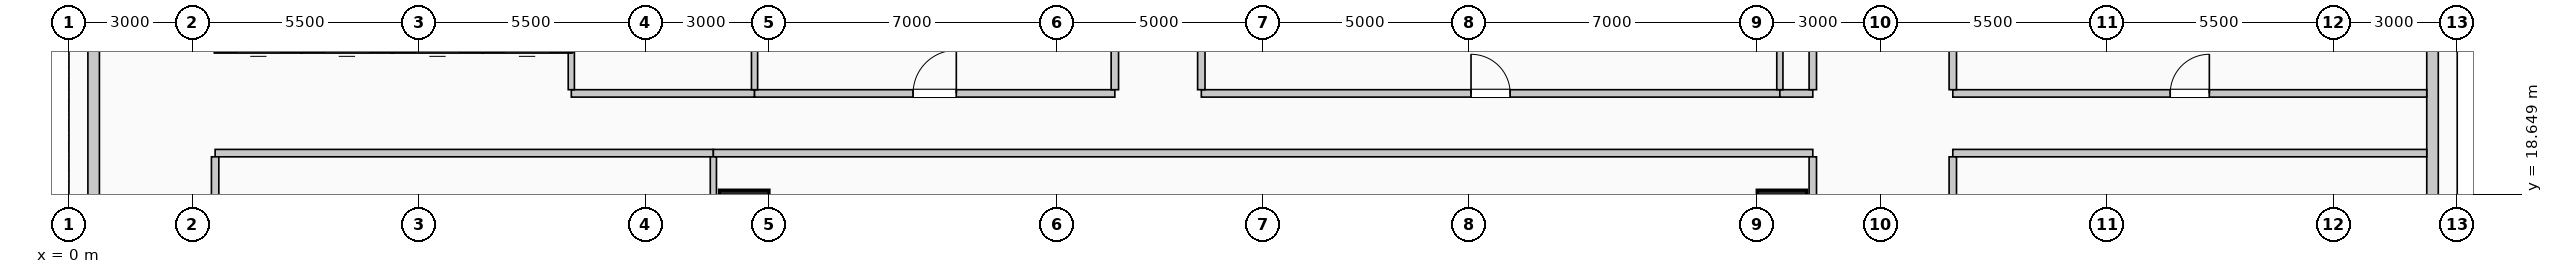
"""IFC4 building model, lengths in metres.
Left out: names, types, materials, properties, quantities, classifications, styles, units other than length and angle.
Written with IfcOpenShell. Run it as: python <this file> out.ifc"""

import sys

from ifc_helpers import new_model, si_unit, direction, frame, frame_2d, origin, origin_2d, place, context, subcontext, project, spatial, rectangle, extrude, element, fill, save


model = new_model("IFC4")
c1 = context("Model", 3, precision=1e-05, world=origin(), true_north=direction((0.0, 1.0)))
c2 = subcontext(c1, "Body", "Model", "MODEL_VIEW")
j1 = project(units=[si_unit("LENGTHUNIT", "METRE"), si_unit("PLANEANGLEUNIT", "RADIAN")], contexts=[c1])
p1 = place(None, origin())
s1 = spatial("IfcSite", under=j1, at=p1, CompositionType="ELEMENT")
p2 = place(p1, origin())
s2 = spatial("IfcBuilding", under=s1, at=p2, CompositionType="ELEMENT")
p3 = place(p2, frame((0.0, 0.0, 58.6)))
s3 = spatial("IfcBuildingStorey", under=s2, at=p3, CompositionType="ELEMENT", Elevation=58.6)
for number, where, z_axis, x_axis in (
    (1, (16.4, 18.0, 0.0), (0.0, 0.0, 1.0), (1.0, 0.0, 0.0)),
    (2, (41.6, 18.0, 0.0), (0.0, 0.0, 1.0), (1.0, 0.0, 0.0)),
):
    element("IfcColumn", number, at=place(p3, frame(where, z_axis=z_axis, x_axis=x_axis)), inside=s3, PredefinedType="COLUMN", context=c2, shape_type="SweptSolid", body=[
        extrude(rectangle(XDim=1.2, YDim=1.5, at=origin_2d()), origin(), (0.0, 0.0, 1.0), 4.0),
    ])
for number, where, z_axis, x_axis in (
    (3, (0.6, 18.47, 0.0), (0.0, 0.0, 1.0), (0.0, 1.0, 0.0)),
    (4, (57.4, 25.53, 0.0), (0.0, 0.0, 1.0), (0.0, -1.0, 0.0)),
):
    element("IfcWall", number, at=place(p3, frame(where, z_axis=z_axis, x_axis=x_axis)), inside=s3, PredefinedType="SOLIDWALL", context=c2, shape_type="SweptSolid", body=[
        extrude(rectangle(XDim=7.06, YDim=0.28, at=frame_2d((3.53, 0.0))), origin(), (0.0, 0.0, 1.0), 2.85),
    ])
p4 = place(p3, frame((5.65, 22.25, 0.0), z_axis=(0.0, 0.0, 1.0), x_axis=(-1.0, 0.0, 0.0)))
e5 = element("IfcWall", 5, at=p4, inside=s3, PredefinedType="SOLIDWALL", context=c2, shape_type="SweptSolid", body=[
    extrude(rectangle(XDim=2.1, YDim=0.3, at=frame_2d((1.05, 0.0))), origin(), (0.0, 0.0, 1.0), 4.0),
])
p5 = place(p4, frame((0.5, 0.0, 0.0)))
e6 = element("IfcOpeningElement", 6, at=p5, cuts=e5, PredefinedType="OPENING", context=c2, shape_type="SweptSolid", body=[
    extrude(rectangle(XDim=1.1, YDim=2.2, at=frame_2d((0.55, 1.1))), frame((0.0, 0.16, 0.0), z_axis=(0.0, -1.0, 0.0), x_axis=(1.0, 0.0, 0.0)), (0.0, 0.0, 1.0), 0.32),
])
p6 = place(p3, frame((7.85, 22.25, 0.0), z_axis=(0.0, 0.0, 1.0), x_axis=(-1.0, 0.0, 0.0)))
e7 = element("IfcWall", 7, at=p6, inside=s3, PredefinedType="SOLIDWALL", context=c2, shape_type="SweptSolid", body=[
    extrude(rectangle(XDim=2.2, YDim=0.3, at=frame_2d((1.1, 0.0))), origin(), (0.0, 0.0, 1.0), 4.0),
])
p7 = place(p6, frame((0.55, 0.0, 0.0)))
e8 = element("IfcOpeningElement", 8, at=p7, cuts=e7, PredefinedType="OPENING", context=c2, shape_type="SweptSolid", body=[
    extrude(rectangle(XDim=1.1, YDim=2.2, at=frame_2d((0.55, 1.1))), frame((0.0, 0.16, 0.0), z_axis=(0.0, -1.0, 0.0), x_axis=(1.0, 0.0, 0.0)), (0.0, 0.0, 1.0), 0.32),
])
p8 = place(p3, frame((10.05, 22.25, 0.0), z_axis=(0.0, 0.0, 1.0), x_axis=(-1.0, 0.0, 0.0)))
e9 = element("IfcWall", 9, at=p8, inside=s3, PredefinedType="SOLIDWALL", context=c2, shape_type="SweptSolid", body=[
    extrude(rectangle(XDim=2.2, YDim=0.3, at=frame_2d((1.1, 0.0))), origin(), (0.0, 0.0, 1.0), 4.0),
])
p9 = place(p8, frame((0.55, 0.0, 0.0)))
e10 = element("IfcOpeningElement", 10, at=p9, cuts=e9, PredefinedType="OPENING", context=c2, shape_type="SweptSolid", body=[
    extrude(rectangle(XDim=1.1, YDim=2.2, at=frame_2d((0.55, 1.1))), frame((0.0, 0.16, 0.0), z_axis=(0.0, -1.0, 0.0), x_axis=(1.0, 0.0, 0.0)), (0.0, 0.0, 1.0), 0.32),
])
p10 = place(p3, frame((12.2, 22.25, 0.0), z_axis=(0.0, 0.0, 1.0), x_axis=(-1.0, 0.0, 0.0)))
e11 = element("IfcWall", 11, at=p10, inside=s3, PredefinedType="SOLIDWALL", context=c2, shape_type="SweptSolid", body=[
    extrude(rectangle(XDim=2.15, YDim=0.3, at=frame_2d((1.075, 0.0))), origin(), (0.0, 0.0, 1.0), 4.0),
])
p11 = place(p10, frame((0.525, 0.0, 0.0)))
e12 = element("IfcOpeningElement", 12, at=p11, cuts=e11, PredefinedType="OPENING", context=c2, shape_type="SweptSolid", body=[
    extrude(rectangle(XDim=1.1, YDim=2.2, at=frame_2d((0.55, 1.1))), frame((0.0, 0.16, 0.0), z_axis=(0.0, -1.0, 0.0), x_axis=(1.0, 0.0, 0.0)), (0.0, 0.0, 1.0), 0.32),
])
p12 = place(p3, frame((3.55, 19.65, 0.0), z_axis=(0.0, 0.0, 1.0), x_axis=(1.0, 0.0, 0.0)))
e13 = element("IfcWall", 13, at=p12, inside=s3, PredefinedType="PARTITIONING", context=c2, shape_type="SweptSolid", body=[
    extrude(rectangle(XDim=12.1, YDim=0.18, at=frame_2d((6.05, 0.0))), origin(), (0.0, 0.0, 1.0), 3.7),
])
p13 = place(p3, frame((15.65, 19.65, 0.0), z_axis=(0.0, 0.0, 1.0), x_axis=(1.0, 0.0, 0.0)))
e14 = element("IfcWall", 14, at=p13, inside=s3, PredefinedType="PARTITIONING", context=c2, shape_type="SweptSolid", body=[
    extrude(rectangle(XDim=26.7, YDim=0.18, at=frame_2d((13.35, 0.0))), origin(), (0.0, 0.0, 1.0), 3.7),
])
p14 = place(p3, frame((45.75, 19.65, 0.0), z_axis=(0.0, 0.0, 1.0), x_axis=(1.0, 0.0, 0.0)))
e15 = element("IfcWall", 15, at=p14, inside=s3, PredefinedType="PARTITIONING", context=c2, shape_type="SweptSolid", body=[
    extrude(rectangle(XDim=11.51, YDim=0.18, at=frame_2d((5.755, 0.0))), origin(), (0.0, 0.0, 1.0), 3.7),
])
p15 = place(p3, frame((12.2, 21.1, 0.0), z_axis=(0.0, 0.0, 1.0), x_axis=(1.0, 0.0, 0.0)))
e16 = element("IfcWall", 16, at=p15, inside=s3, PredefinedType="PARTITIONING", context=c2, shape_type="SweptSolid", body=[
    extrude(rectangle(XDim=4.45, YDim=0.18, at=frame_2d((2.225, 0.0))), origin(), (0.0, 0.0, 1.0), 3.7),
])
p16 = place(p3, frame((16.65, 21.1, 0.0), z_axis=(0.0, 0.0, 1.0), x_axis=(1.0, 0.0, 0.0)))
e17 = element("IfcWall", 17, at=p16, inside=s3, PredefinedType="PARTITIONING", context=c2, shape_type="SweptSolid", body=[
    extrude(rectangle(XDim=8.75, YDim=0.18, at=frame_2d((4.375, 0.0))), origin(), (0.0, 0.0, 1.0), 3.7),
])
p17 = place(p16, frame((3.85, 0.0, 0.0)))
e18 = element("IfcOpeningElement", 18, at=p17, cuts=e17, PredefinedType="OPENING", context=c2, shape_type="SweptSolid", body=[
    extrude(rectangle(XDim=1.05, YDim=2.15, at=frame_2d((0.525, 1.075))), frame((0.0, 0.1, 0.0), z_axis=(0.0, -1.0, 0.0), x_axis=(1.0, 0.0, 0.0)), (0.0, 0.0, 1.0), 0.2),
])
p18 = place(p3, frame((27.5, 21.1, 0.0), z_axis=(0.0, 0.0, 1.0), x_axis=(1.0, 0.0, 0.0)))
e19 = element("IfcWall", 19, at=p18, inside=s3, PredefinedType="PARTITIONING", context=c2, shape_type="SweptSolid", body=[
    extrude(rectangle(XDim=14.05, YDim=0.18, at=frame_2d((7.025, 0.0))), origin(), (0.0, 0.0, 1.0), 3.7),
])
p19 = place(p18, frame((6.55, 0.0, 0.0)))
e20 = element("IfcOpeningElement", 20, at=p19, cuts=e19, PredefinedType="OPENING", context=c2, shape_type="SweptSolid", body=[
    extrude(rectangle(XDim=0.95, YDim=2.15, at=frame_2d((0.475, 1.075))), frame((0.0, 0.1, 0.0), z_axis=(0.0, -1.0, 0.0), x_axis=(1.0, 0.0, 0.0)), (0.0, 0.0, 1.0), 0.2),
])
p20 = place(p3, frame((41.55, 21.1, 0.0), z_axis=(0.0, 0.0, 1.0), x_axis=(1.0, 0.0, 0.0)))
e21 = element("IfcWall", 21, at=p20, inside=s3, PredefinedType="PARTITIONING", context=c2, shape_type="SweptSolid", body=[
    extrude(rectangle(XDim=0.8, YDim=0.18, at=frame_2d((0.4, 0.0))), origin(), (0.0, 0.0, 1.0), 3.7),
])
p21 = place(p3, frame((45.75, 21.1, 0.0), z_axis=(0.0, 0.0, 1.0), x_axis=(1.0, 0.0, 0.0)))
e22 = element("IfcWall", 22, at=p21, inside=s3, PredefinedType="PARTITIONING", context=c2, shape_type="SweptSolid", body=[
    extrude(rectangle(XDim=11.51, YDim=0.18, at=frame_2d((5.755, 0.0))), origin(), (0.0, 0.0, 1.0), 3.7),
])
p22 = place(p21, frame((5.28, 0.0, 0.0)))
e23 = element("IfcOpeningElement", 23, at=p22, cuts=e22, PredefinedType="OPENING", context=c2, shape_type="SweptSolid", body=[
    extrude(rectangle(XDim=0.95, YDim=2.15, at=frame_2d((0.475, 1.075))), frame((0.0, 0.1, 0.0), z_axis=(0.0, -1.0, 0.0), x_axis=(1.0, 0.0, 0.0)), (0.0, 0.0, 1.0), 0.2),
])
p23 = place(p3, frame((3.55, 16.39, 0.0), z_axis=(0.0, 0.0, 1.0), x_axis=(0.0, 1.0, 0.0)))
e24 = element("IfcWall", 24, at=p23, inside=s3, PredefinedType="PARTITIONING", context=c2, shape_type="SweptSolid", body=[
    extrude(rectangle(XDim=3.17, YDim=0.18, at=frame_2d((1.585, 0.0))), origin(), (0.0, 0.0, 1.0), 3.7),
])
p24 = place(p3, frame((12.2, 21.19, 0.0), z_axis=(0.0, 0.0, 1.0), x_axis=(0.0, 1.0, 0.0)))
e25 = element("IfcWall", 25, at=p24, inside=s3, PredefinedType="PARTITIONING", context=c2, shape_type="SweptSolid", body=[
    extrude(rectangle(XDim=0.91, YDim=0.15, at=frame_2d((0.455, 0.0))), origin(), (0.0, 0.0, 1.0), 3.7),
])
p25 = place(p3, frame((15.65, 16.39, 0.0), z_axis=(0.0, 0.0, 1.0), x_axis=(0.0, 1.0, 0.0)))
e26 = element("IfcWall", 26, at=p25, inside=s3, PredefinedType="PARTITIONING", context=c2, shape_type="SweptSolid", body=[
    extrude(rectangle(XDim=3.17, YDim=0.15, at=frame_2d((1.585, 0.0))), origin(), (0.0, 0.0, 1.0), 3.7),
])
p26 = place(p3, frame((16.65, 21.19, 0.0), z_axis=(0.0, 0.0, 1.0), x_axis=(0.0, 1.0, 0.0)))
e27 = element("IfcWall", 27, at=p26, inside=s3, PredefinedType="PARTITIONING", context=c2, shape_type="SweptSolid", body=[
    extrude(rectangle(XDim=3.735, YDim=0.15, at=frame_2d((1.868, 0.0))), origin(), (0.0, 0.0, 1.0), 2.995),
])
p27 = place(p3, frame((25.4, 21.19, 0.0), z_axis=(0.0, 0.0, 1.0), x_axis=(0.0, 1.0, 0.0)))
e28 = element("IfcWall", 28, at=p27, inside=s3, PredefinedType="PARTITIONING", context=c2, shape_type="SweptSolid", body=[
    extrude(rectangle(XDim=3.735, YDim=0.18, at=frame_2d((1.868, 0.0))), origin(), (0.0, 0.0, 1.0), 3.7),
])
p28 = place(p3, frame((27.5, 21.19, 0.0), z_axis=(0.0, 0.0, 1.0), x_axis=(0.0, 1.0, 0.0)))
e29 = element("IfcWall", 29, at=p28, inside=s3, PredefinedType="PARTITIONING", context=c2, shape_type="SweptSolid", body=[
    extrude(rectangle(XDim=5.72, YDim=0.18, at=frame_2d((2.86, 0.0))), origin(), (0.0, 0.0, 1.0), 3.7),
])
p29 = place(p3, frame((41.55, 21.19, 0.0), z_axis=(0.0, 0.0, 1.0), x_axis=(0.0, 1.0, 0.0)))
e30 = element("IfcWall", 30, at=p29, inside=s3, PredefinedType="PARTITIONING", context=c2, shape_type="SweptSolid", body=[
    extrude(rectangle(XDim=4.06, YDim=0.15, at=frame_2d((2.03, 0.0))), origin(), (0.0, 0.0, 1.0), 2.995),
])
p30 = place(p3, frame((42.35, 16.39, 0.0), z_axis=(0.0, 0.0, 1.0), x_axis=(0.0, 1.0, 0.0)))
e31 = element("IfcWall", 31, at=p30, inside=s3, PredefinedType="PARTITIONING", context=c2, shape_type="SweptSolid", body=[
    extrude(rectangle(XDim=3.17, YDim=0.18, at=frame_2d((1.585, 0.0))), origin(), (0.0, 0.0, 1.0), 3.7),
])
p31 = place(p3, frame((42.35, 21.19, 0.0), z_axis=(0.0, 0.0, 1.0), x_axis=(0.0, 1.0, 0.0)))
e32 = element("IfcWall", 32, at=p31, inside=s3, PredefinedType="PARTITIONING", context=c2, shape_type="SweptSolid", body=[
    extrude(rectangle(XDim=11.085, YDim=0.18, at=frame_2d((5.542, 0.0))), origin(), (0.0, 0.0, 1.0), 3.7),
])
p32 = place(p3, frame((45.75, 16.39, 0.0), z_axis=(0.0, 0.0, 1.0), x_axis=(0.0, 1.0, 0.0)))
e33 = element("IfcWall", 33, at=p32, inside=s3, PredefinedType="PARTITIONING", context=c2, shape_type="SweptSolid", body=[
    extrude(rectangle(XDim=3.17, YDim=0.18, at=frame_2d((1.585, 0.0))), origin(), (0.0, 0.0, 1.0), 3.7),
])
p33 = place(p3, frame((45.75, 21.19, 0.0), z_axis=(0.0, 0.0, 1.0), x_axis=(0.0, 1.0, 0.0)))
e34 = element("IfcWall", 34, at=p33, inside=s3, PredefinedType="PARTITIONING", context=c2, shape_type="SweptSolid", body=[
    extrude(rectangle(XDim=6.615, YDim=0.18, at=frame_2d((3.308, 0.0))), origin(), (0.0, 0.0, 1.0), 3.7),
])
p34 = place(p17, origin())
e35 = element("IfcDoor", 35, at=p34, inside=s3, OperationType="SINGLE_SWING_RIGHT", PredefinedType="DOOR", context=c2, shape_type="SweptSolid", body=[
    extrude(rectangle(XDim=1.05, YDim=2.15, at=frame_2d((0.525, 1.075))), frame((0.0, 0.025, 0.0), z_axis=(0.0, -1.0, 0.0), x_axis=(1.0, 0.0, 0.0)), (0.0, 0.0, 1.0), 0.05),
])
fill(e18, e35)
p35 = place(p19, origin())
e36 = element("IfcDoor", 36, at=p35, inside=s3, OperationType="SINGLE_SWING_LEFT", PredefinedType="DOOR", context=c2, shape_type="SweptSolid", body=[
    extrude(rectangle(XDim=0.95, YDim=2.15, at=frame_2d((0.475, 1.075))), frame((0.0, 0.025, 0.0), z_axis=(0.0, -1.0, 0.0), x_axis=(1.0, 0.0, 0.0)), (0.0, 0.0, 1.0), 0.05),
])
fill(e20, e36)
p36 = place(p22, origin())
e37 = element("IfcDoor", 37, at=p36, inside=s3, OperationType="SINGLE_SWING_RIGHT", PredefinedType="DOOR", context=c2, shape_type="SweptSolid", body=[
    extrude(rectangle(XDim=0.95, YDim=2.15, at=frame_2d((0.475, 1.075))), frame((0.0, 0.025, 0.0), z_axis=(0.0, -1.0, 0.0), x_axis=(1.0, 0.0, 0.0)), (0.0, 0.0, 1.0), 0.05),
])
fill(e23, e37)
save(model, sys.argv[1])
